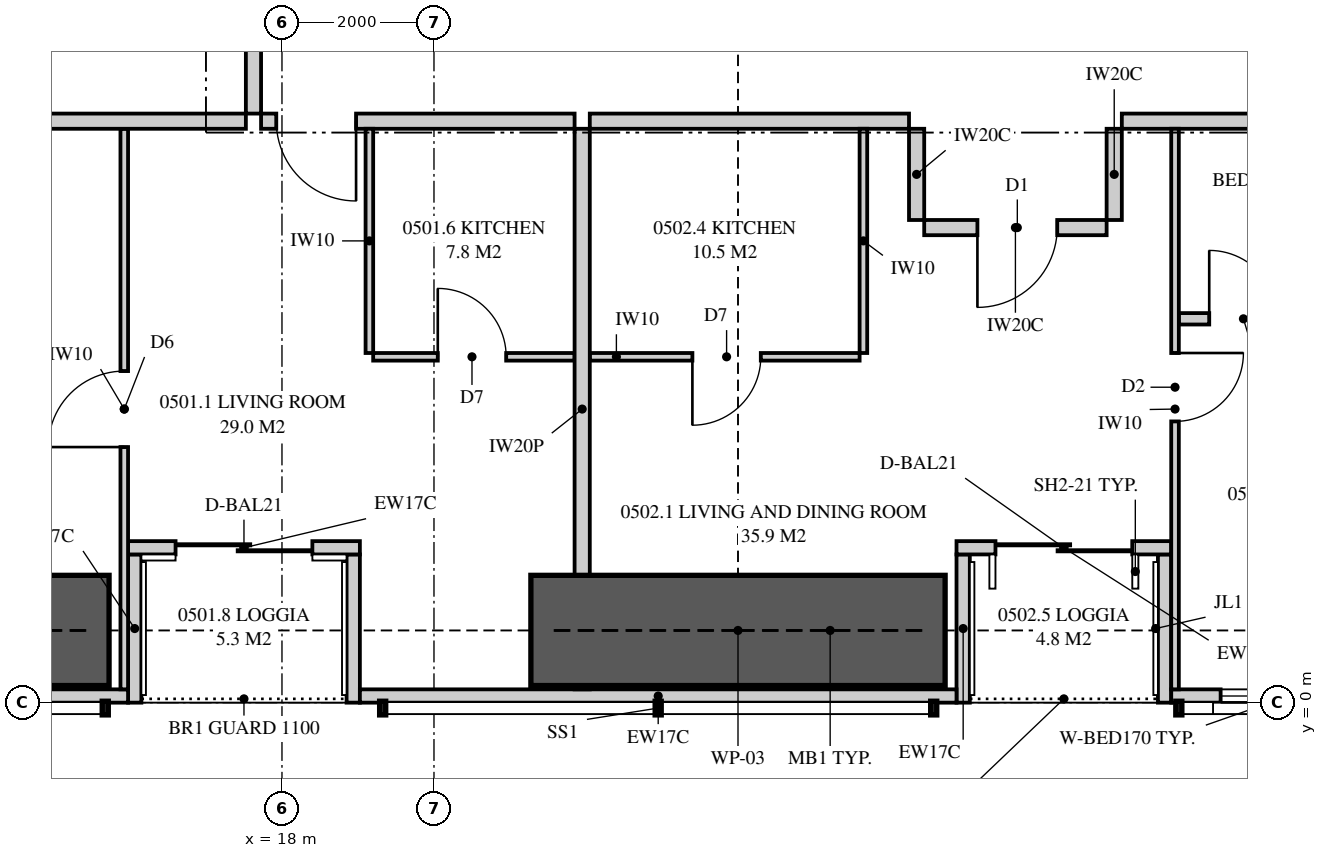
"""IFC4 building model, lengths in metres.
Left out: names, types, materials, properties, quantities, classifications, styles, units other than length and angle.
Written with IfcOpenShell. Run it as: python <this file> out.ifc"""

import sys

from ifc_helpers import new_model, si_unit, direction, frame, frame_2d, origin, place, context, subcontext, project, spatial, polyline, rectangle, outline, extrude, element, fill, save


model = new_model("IFC4")
c1 = context("Model", 3, precision=1e-05, world=origin(), true_north=direction((0.0, 1.0)))
c2 = subcontext(c1, "Body", "Model", "MODEL_VIEW")
j1 = project(units=[si_unit("LENGTHUNIT", "METRE"), si_unit("PLANEANGLEUNIT", "RADIAN")], contexts=[c1])
p1 = place(None, origin())
s1 = spatial("IfcSite", under=j1, at=p1, CompositionType="ELEMENT")
p2 = place(p1, origin())
s2 = spatial("IfcBuilding", under=s1, at=p2, CompositionType="ELEMENT")
p3 = place(p2, frame((0.0, 0.0, 24.35)))
s3 = spatial("IfcBuildingStorey", under=s2, at=p3, CompositionType="ELEMENT", Elevation=24.35)
p4 = place(p3, frame((5.051, 0.087, 0.0), z_axis=(0.0, 0.0, 1.0), x_axis=(1.0, 0.0, 0.0)))
e1 = element("IfcWall", 1, at=p4, inside=s3, PredefinedType="SOLIDWALL", context=c2, shape_type="SweptSolid", body=[
    extrude(outline(polyline([(0.0, 0.0), (10.924, 0.0), (10.924, 2.15), (7.949, 2.15), (7.949, 3.11), (7.793, 3.11), (7.793, 2.15), (7.745, 2.15), (7.745, 3.11), (0.0, 3.11), (0.0, 0.0)])), frame((0.0, 0.087, 0.0), z_axis=(0.0, -1.0, 0.0), x_axis=(1.0, 0.0, 0.0)), (0.0, 0.0, 1.0), 0.175),
])
p5 = place(p4, frame((2.199, 0.0, 0.4)))
e2 = element("IfcOpeningElement", 2, at=p5, cuts=e1, PredefinedType="OPENING", context=c2, shape_type="SweptSolid", body=[
    extrude(rectangle(XDim=1.8, YDim=1.7, at=frame_2d((0.9, 0.85))), frame((0.0, 0.097, 0.0), z_axis=(0.0, -1.0, 0.0), x_axis=(1.0, 0.0, 0.0)), (0.0, 0.0, 1.0), 0.195),
])
p6 = place(p3, frame((19.025, 0.087, 0.0), z_axis=(0.0, 0.0, 1.0), x_axis=(1.0, 0.0, 0.0)))
e3 = element("IfcWall", 3, at=p6, inside=s3, PredefinedType="SOLIDWALL", context=c2, shape_type="SweptSolid", body=[
    extrude(rectangle(XDim=7.85, YDim=0.175, at=frame_2d((3.925, 0.0))), origin(), (0.0, 0.0, 1.0), 2.15),
])
p7 = place(p3, frame((29.7, 0.087, 0.0), z_axis=(0.0, 0.0, 1.0), x_axis=(1.0, 0.0, 0.0)))
e4 = element("IfcWall", 4, at=p7, inside=s3, PredefinedType="SOLIDWALL", context=c2, shape_type="SweptSolid", body=[
    extrude(outline(polyline([(0.0, 0.0), (8.075, 0.0), (8.075, 3.11), (5.504, 3.11), (5.504, 2.15), (5.456, 2.15), (5.456, 3.11), (5.3, 3.11), (5.3, 2.15), (0.0, 2.15), (0.0, 0.0)])), frame((0.0, 0.087, 0.0), z_axis=(0.0, -1.0, 0.0), x_axis=(1.0, 0.0, 0.0)), (0.0, 0.0, 1.0), 0.175),
])
p8 = place(p7, frame((0.65, 0.0, 0.4)))
e5 = element("IfcOpeningElement", 5, at=p8, cuts=e4, PredefinedType="OPENING", context=c2, shape_type="SweptSolid", body=[
    extrude(rectangle(XDim=1.8, YDim=1.7, at=frame_2d((0.9, 0.85))), frame((0.0, 0.097, 0.0), z_axis=(0.0, -1.0, 0.0), x_axis=(1.0, 0.0, 0.0)), (0.0, 0.0, 1.0), 0.195),
])
p9 = place(p3, frame((15.975, 2.038, 0.0), z_axis=(0.0, 0.0, 1.0), x_axis=(1.0, 0.0, 0.0)))
e6 = element("IfcWall", 6, at=p9, inside=s3, PredefinedType="SOLIDWALL", context=c2, shape_type="SweptSolid", body=[
    extrude(rectangle(XDim=3.05, YDim=0.175, at=frame_2d((1.525, 0.0))), origin(), (0.0, 0.0, 1.0), 3.11),
])
p10 = place(p9, frame((0.625, 0.0, 0.0)))
e7 = element("IfcOpeningElement", 7, at=p10, cuts=e6, PredefinedType="OPENING", context=c2, shape_type="SweptSolid", body=[
    extrude(rectangle(XDim=1.8, YDim=2.1, at=frame_2d((0.9, 1.05))), frame((0.0, 0.097, 0.0), z_axis=(0.0, -1.0, 0.0), x_axis=(1.0, 0.0, 0.0)), (0.0, 0.0, 1.0), 0.195),
])
for number, where, z_axis, x_axis in (
    (8, (16.062, 0.0, 0.0), (0.0, 0.0, 1.0), (0.0, 1.0, 0.0)),
    (9, (18.938, 0.0, 0.0), (0.0, 0.0, 1.0), (0.0, 1.0, 0.0)),
):
    element("IfcWall", number, at=place(p3, frame(where, z_axis=z_axis, x_axis=x_axis)), inside=s3, PredefinedType="SOLIDWALL", context=c2, shape_type="SweptSolid", body=[
        extrude(outline(polyline([(0.0, 0.0), (1.95, 0.0), (1.95, 3.11), (1.75, 3.11), (1.75, 2.15), (0.15, 2.15), (0.15, 3.11), (0.0, 3.11), (0.0, 0.0)])), frame((0.0, 0.087, 0.0), z_axis=(0.0, -1.0, 0.0), x_axis=(1.0, 0.0, 0.0)), (0.0, 0.0, 1.0), 0.175),
    ])
p11 = place(p3, frame((26.875, 2.038, 0.0), z_axis=(0.0, 0.0, 1.0), x_axis=(1.0, 0.0, 0.0)))
e10 = element("IfcWall", 10, at=p11, inside=s3, PredefinedType="SOLIDWALL", context=c2, shape_type="SweptSolid", body=[
    extrude(rectangle(XDim=2.825, YDim=0.175, at=frame_2d((1.413, 0.0))), origin(), (0.0, 0.0, 1.0), 3.11),
])
p12 = place(p11, frame((0.512, 0.0, 0.0)))
e11 = element("IfcOpeningElement", 11, at=p12, cuts=e10, PredefinedType="OPENING", context=c2, shape_type="SweptSolid", body=[
    extrude(rectangle(XDim=1.8, YDim=2.1, at=frame_2d((0.9, 1.05))), frame((0.0, 0.097, 0.0), z_axis=(0.0, -1.0, 0.0), x_axis=(1.0, 0.0, 0.0)), (0.0, 0.0, 1.0), 0.195),
])
for number, where, z_axis, x_axis in (
    (12, (26.962, 0.0, 0.0), (0.0, 0.0, 1.0), (0.0, 1.0, 0.0)),
    (13, (29.613, 0.0, 0.0), (0.0, 0.0, 1.0), (0.0, 1.0, 0.0)),
):
    element("IfcWall", number, at=place(p3, frame(where, z_axis=z_axis, x_axis=x_axis)), inside=s3, PredefinedType="SOLIDWALL", context=c2, shape_type="SweptSolid", body=[
        extrude(outline(polyline([(0.0, 0.0), (1.95, 0.0), (1.95, 3.11), (1.75, 3.11), (1.75, 2.15), (0.15, 2.15), (0.15, 3.11), (0.0, 3.11), (0.0, 0.0)])), frame((0.0, 0.087, 0.0), z_axis=(0.0, -1.0, 0.0), x_axis=(1.0, 0.0, 0.0)), (0.0, 0.0, 1.0), 0.175),
    ])
p13 = place(p3, frame((21.95, 0.175, 0.0), z_axis=(0.0, 0.0, 1.0), x_axis=(0.0, 1.0, 0.0)))
e14 = element("IfcWall", 14, at=p13, inside=s3, PredefinedType="PARTITIONING", context=c2, shape_type="SweptSolid", body=[
    extrude(outline(polyline([(0.529, 2.15), (0.0, 2.15), (0.0, 0.0), (0.529, 0.0), (0.529, 0.09), (1.021, 0.09), (1.021, 0.0), (7.375, 0.0), (7.375, 3.11), (1.685, 3.11), (1.685, 2.15), (1.021, 2.15), (1.021, 2.06), (0.529, 2.06), (0.529, 2.15)])), frame((0.0, 0.1, 0.0), z_axis=(0.0, -1.0, 0.0), x_axis=(1.0, 0.0, 0.0)), (0.0, 0.0, 1.0), 0.2),
])
p14 = place(p3, frame((17.725, 7.65, 0.0), z_axis=(0.0, 0.0, 1.0), x_axis=(1.0, 0.0, 0.0)))
e15 = element("IfcWall", 15, at=p14, inside=s3, PredefinedType="PARTITIONING", context=c2, shape_type="SweptSolid", body=[
    extrude(rectangle(XDim=4.125, YDim=0.2, at=frame_2d((2.062, 0.0))), origin(), (0.0, 0.0, 1.0), 3.11),
])
p15 = place(p14, frame((0.2, 0.0, 0.0)))
e16 = element("IfcOpeningElement", 16, at=p15, cuts=e15, PredefinedType="OPENING", context=c2, shape_type="SweptSolid", body=[
    extrude(rectangle(XDim=1.05, YDim=2.2, at=frame_2d((0.525, 1.1))), frame((0.0, 0.11, 0.0), z_axis=(0.0, -1.0, 0.0), x_axis=(1.0, 0.0, 0.0)), (0.0, 0.0, 1.0), 0.22),
])
p16 = place(p3, frame((19.2, 4.55, 0.0), z_axis=(0.0, 0.0, 1.0), x_axis=(1.0, 0.0, 0.0)))
e17 = element("IfcWall", 17, at=p16, inside=s3, PredefinedType="PARTITIONING", context=c2, shape_type="SweptSolid", body=[
    extrude(rectangle(XDim=2.65, YDim=0.1, at=frame_2d((1.325, 0.0))), origin(), (0.0, 0.0, 1.0), 3.11),
])
p17 = place(p16, frame((0.85, 0.0, 0.0)))
e18 = element("IfcOpeningElement", 18, at=p17, cuts=e17, PredefinedType="OPENING", context=c2, shape_type="SweptSolid", body=[
    extrude(rectangle(XDim=0.9, YDim=2.1, at=frame_2d((0.45, 1.05))), frame((0.0, 0.06, 0.0), z_axis=(0.0, -1.0, 0.0), x_axis=(1.0, 0.0, 0.0)), (0.0, 0.0, 1.0), 0.12),
])
p18 = place(p3, frame((19.15, 4.6, 0.0), z_axis=(0.0, 0.0, 1.0), x_axis=(0.0, 1.0, 0.0)))
e19 = element("IfcWall", 19, at=p18, inside=s3, PredefinedType="PARTITIONING", context=c2, shape_type="SweptSolid", body=[
    extrude(rectangle(XDim=2.95, YDim=0.1, at=frame_2d((1.475, 0.0))), origin(), (0.0, 0.0, 1.0), 3.11),
])
p19 = place(p3, frame((15.925, 0.175, 0.0), z_axis=(0.0, 0.0, 1.0), x_axis=(0.0, 1.0, 0.0)))
e20 = element("IfcWall", 20, at=p19, inside=s3, PredefinedType="PARTITIONING", context=c2, shape_type="SweptSolid", body=[
    extrude(outline(polyline([(0.0, 0.0), (7.375, 0.0), (7.375, 3.11), (1.635, 3.11), (1.635, 2.15), (0.0, 2.15), (0.0, 3.11), (0.0, 0.0)])), frame((0.0, 0.05, 0.0), z_axis=(0.0, -1.0, 0.0), x_axis=(1.0, 0.0, 0.0)), (0.0, 0.0, 1.0), 0.1),
])
p20 = place(p19, frame((3.188, 0.0, 0.0)))
e21 = element("IfcOpeningElement", 21, at=p20, cuts=e20, PredefinedType="OPENING", context=c2, shape_type="SweptSolid", body=[
    extrude(rectangle(XDim=1.0, YDim=2.1, at=frame_2d((0.5, 1.05))), frame((0.0, 0.06, 0.0), z_axis=(0.0, -1.0, 0.0), x_axis=(1.0, 0.0, 0.0)), (0.0, 0.0, 1.0), 0.12),
])
p21 = place(p3, frame((22.05, 7.65, 0.0), z_axis=(0.0, 0.0, 1.0), x_axis=(1.0, 0.0, 0.0)))
e22 = element("IfcWall", 22, at=p21, inside=s3, PredefinedType="PARTITIONING", context=c2, shape_type="SweptSolid", body=[
    extrude(outline(polyline([(0.0, 0.0), (4.2, 0.0), (4.2, 3.11), (2.287, 3.11), (2.287, 2.541), (1.613, 2.541), (1.613, 3.11), (0.0, 3.11), (0.0, 0.0)])), frame((0.0, 0.1, 0.0), z_axis=(0.0, -1.0, 0.0), x_axis=(1.0, 0.0, 0.0)), (0.0, 0.0, 1.0), 0.2),
])
p22 = place(p3, frame((29.75, 0.175, 0.0), z_axis=(0.0, 0.0, 1.0), x_axis=(0.0, 1.0, 0.0)))
e23 = element("IfcWall", 23, at=p22, inside=s3, PredefinedType="PARTITIONING", context=c2, shape_type="SweptSolid", body=[
    extrude(outline(polyline([(0.0, 0.0), (7.375, 0.0), (7.375, 3.11), (1.635, 3.11), (1.635, 2.15), (0.0, 2.15), (0.0, 3.11), (0.0, 0.0)])), frame((0.0, 0.05, 0.0), z_axis=(0.0, -1.0, 0.0), x_axis=(1.0, 0.0, 0.0)), (0.0, 0.0, 1.0), 0.1),
])
p23 = place(p22, frame((3.525, 0.0, 0.0)))
e24 = element("IfcOpeningElement", 24, at=p23, cuts=e23, PredefinedType="OPENING", context=c2, shape_type="SweptSolid", body=[
    extrude(rectangle(XDim=0.9, YDim=2.1, at=frame_2d((0.45, 1.05))), frame((0.0, 0.06, 0.0), z_axis=(0.0, -1.0, 0.0), x_axis=(1.0, 0.0, 0.0)), (0.0, 0.0, 1.0), 0.12),
])
p24 = place(p3, frame((29.8, 5.05, 0.0), z_axis=(0.0, 0.0, 1.0), x_axis=(1.0, 0.0, 0.0)))
e25 = element("IfcWall", 25, at=p24, inside=s3, PredefinedType="PLUMBINGWALL", context=c2, shape_type="SweptSolid", body=[
    extrude(rectangle(XDim=3.45, YDim=0.15, at=frame_2d((1.725, 0.0))), origin(), (0.0, 0.0, 1.0), 3.11),
])
p25 = place(p24, frame((0.4, 0.0, 0.0)))
e26 = element("IfcOpeningElement", 26, at=p25, cuts=e25, PredefinedType="OPENING", context=c2, shape_type="SweptSolid", body=[
    extrude(rectangle(XDim=0.9, YDim=2.1, at=frame_2d((0.45, 1.05))), frame((0.0, 0.085, 0.0), z_axis=(0.0, -1.0, 0.0), x_axis=(1.0, 0.0, 0.0)), (0.0, 0.0, 1.0), 0.17),
])
p26 = place(p3, frame((22.05, 4.55, 0.0), z_axis=(0.0, 0.0, 1.0), x_axis=(1.0, 0.0, 0.0)))
e27 = element("IfcWall", 27, at=p26, inside=s3, PredefinedType="PARTITIONING", context=c2, shape_type="SweptSolid", body=[
    extrude(outline(polyline([(0.0, 0.0), (3.55, 0.0), (3.55, 3.11), (2.237, 3.11), (2.237, 2.541), (1.663, 2.541), (1.663, 3.11), (0.0, 3.11), (0.0, 0.0)])), frame((0.0, 0.05, 0.0), z_axis=(0.0, -1.0, 0.0), x_axis=(1.0, 0.0, 0.0)), (0.0, 0.0, 1.0), 0.1),
])
p27 = place(p26, frame((1.35, 0.0, 0.0)))
e28 = element("IfcOpeningElement", 28, at=p27, cuts=e27, PredefinedType="OPENING", context=c2, shape_type="SweptSolid", body=[
    extrude(rectangle(XDim=0.9, YDim=2.1, at=frame_2d((0.45, 1.05))), frame((0.0, 0.06, 0.0), z_axis=(0.0, -1.0, 0.0), x_axis=(1.0, 0.0, 0.0)), (0.0, 0.0, 1.0), 0.12),
])
p28 = place(p3, frame((25.65, 4.6, 0.0), z_axis=(0.0, 0.0, 1.0), x_axis=(0.0, 1.0, 0.0)))
e29 = element("IfcWall", 29, at=p28, inside=s3, PredefinedType="PARTITIONING", context=c2, shape_type="SweptSolid", body=[
    extrude(rectangle(XDim=2.95, YDim=0.1, at=frame_2d((1.475, 0.0))), origin(), (0.0, 0.0, 1.0), 3.11),
])
p29 = place(p3, frame((2.0, 7.65, 0.0), z_axis=(0.0, 0.0, 1.0), x_axis=(1.0, 0.0, 0.0)))
e30 = element("IfcWall", 30, at=p29, inside=s3, PredefinedType="PARTITIONING", context=c2, shape_type="SweptSolid", body=[
    extrude(outline(polyline([(0.0, 0.0), (15.525, 0.0), (15.525, 3.11), (11.337, 3.11), (11.337, 2.541), (10.663, 2.541), (10.663, 3.11), (9.51, 3.11), (9.51, 2.51), (6.89, 2.51), (6.89, 3.11), (2.969, 3.11), (2.969, 2.541), (2.74, 2.541), (2.74, 2.15), (0.896, 2.15), (0.896, 3.11), (0.0, 3.11), (0.0, 0.0)])), frame((0.0, 0.1, 0.0), z_axis=(0.0, -1.0, 0.0), x_axis=(1.0, 0.0, 0.0)), (0.0, 0.0, 1.0), 0.2),
])
p30 = place(p3, frame((17.625, 7.75, 0.0), z_axis=(0.0, 0.0, 1.0), x_axis=(0.0, 1.0, 0.0)))
e31 = element("IfcWall", 31, at=p30, inside=s3, PredefinedType="PARTITIONING", context=c2, shape_type="SweptSolid", body=[
    extrude(outline(polyline([(0.0, 0.0), (9.35, 0.0), (9.35, 3.11), (5.587, 3.11), (5.587, 2.541), (4.913, 2.541), (4.913, 3.11), (0.0, 3.11), (0.0, 0.0)])), frame((0.0, 0.1, 0.0), z_axis=(0.0, -1.0, 0.0), x_axis=(1.0, 0.0, 0.0)), (0.0, 0.0, 1.0), 0.2),
])
p31 = place(p3, frame((29.05, 7.65, 0.0), z_axis=(0.0, 0.0, 1.0), x_axis=(1.0, 0.0, 0.0)))
e32 = element("IfcWall", 32, at=p31, inside=s3, PredefinedType="PARTITIONING", context=c2, shape_type="SweptSolid", body=[
    extrude(rectangle(XDim=4.2, YDim=0.2, at=frame_2d((2.1, 0.0))), origin(), (0.0, 0.0, 1.0), 3.11),
])
p32 = place(p3, frame((26.45, 6.25, 0.0), z_axis=(0.0, 0.0, 1.0), x_axis=(1.0, 0.0, 0.0)))
e33 = element("IfcWall", 33, at=p32, inside=s3, PredefinedType="PARTITIONING", context=c2, shape_type="SweptSolid", body=[
    extrude(rectangle(XDim=2.4, YDim=0.2, at=frame_2d((1.2, 0.0))), origin(), (0.0, 0.0, 1.0), 3.11),
])
p33 = place(p32, frame((0.7, 0.0, 0.0)))
e34 = element("IfcOpeningElement", 34, at=p33, cuts=e33, PredefinedType="OPENING", context=c2, shape_type="SweptSolid", body=[
    extrude(rectangle(XDim=1.05, YDim=2.2, at=frame_2d((0.525, 1.1))), frame((0.0, 0.11, 0.0), z_axis=(0.0, -1.0, 0.0), x_axis=(1.0, 0.0, 0.0)), (0.0, 0.0, 1.0), 0.22),
])
for number, where, z_axis, x_axis in (
    (35, (26.35, 7.55, 0.0), (0.0, 0.0, 1.0), (0.0, -1.0, 0.0)),
    (36, (28.95, 7.55, 0.0), (0.0, 0.0, 1.0), (0.0, -1.0, 0.0)),
):
    element("IfcWall", number, at=place(p3, frame(where, z_axis=z_axis, x_axis=x_axis)), inside=s3, PredefinedType="PARTITIONING", context=c2, shape_type="SweptSolid", body=[
        extrude(rectangle(XDim=1.2, YDim=0.2, at=frame_2d((0.6, 0.0))), origin(), (0.0, 0.0, 1.0), 3.11),
    ])
for number, where, z_axis, x_axis in (
    (37, (10.275, 0.95, 0.0), (0.0, 0.0, 1.0), (1.0, 0.0, 0.0)),
    (38, (21.275, 0.95, 0.0), (0.0, 0.0, 1.0), (1.0, 0.0, 0.0)),
):
    element("IfcWall", number, at=place(p3, frame(where, z_axis=z_axis, x_axis=x_axis)), inside=s3, PredefinedType="SHEAR", context=c2, shape_type="SweptSolid", body=[
        extrude(rectangle(XDim=5.45, YDim=1.45, at=frame_2d((2.725, 0.0))), origin(), (0.0, 0.0, 1.0), 3.35),
    ])
p34 = place(p10, origin())
e39 = element("IfcDoor", 39, at=p34, inside=s3, OperationType="SLIDING_TO_LEFT", PredefinedType="DOOR", context=c2, shape_type="SweptSolid", body=[
    extrude(rectangle(XDim=1.8, YDim=2.1, at=frame_2d((0.9, 1.05))), frame((0.0, 0.025, 0.0), z_axis=(0.0, -1.0, 0.0), x_axis=(1.0, 0.0, 0.0)), (0.0, 0.0, 1.0), 0.05),
])
fill(e7, e39)
p35 = place(p12, origin())
e40 = element("IfcDoor", 40, at=p35, inside=s3, OperationType="SLIDING_TO_LEFT", PredefinedType="DOOR", context=c2, shape_type="SweptSolid", body=[
    extrude(rectangle(XDim=1.8, YDim=2.1, at=frame_2d((0.9, 1.05))), frame((0.0, 0.025, 0.0), z_axis=(0.0, -1.0, 0.0), x_axis=(1.0, 0.0, 0.0)), (0.0, 0.0, 1.0), 0.05),
])
fill(e11, e40)
p36 = place(p8, origin())
e41 = element("IfcWindow", 41, at=p36, inside=s3, PartitioningType="SINGLE_PANEL", PredefinedType="WINDOW", context=c2, shape_type="SweptSolid", body=[
    extrude(rectangle(XDim=1.8, YDim=1.7, at=frame_2d((0.9, 0.85))), frame((0.0, 0.03, 0.0), z_axis=(0.0, -1.0, 0.0), x_axis=(1.0, 0.0, 0.0)), (0.0, 0.0, 1.0), 0.06),
])
fill(e5, e41)
p37 = place(p15, frame((1.05, 0.0, 0.0), z_axis=(0.0, 0.0, 1.0), x_axis=(-1.0, 0.0, 0.0)))
e42 = element("IfcDoor", 42, at=p37, inside=s3, OperationType="SINGLE_SWING_LEFT", PredefinedType="DOOR", context=c2, shape_type="SweptSolid", body=[
    extrude(rectangle(XDim=1.05, YDim=2.2, at=frame_2d((0.525, 1.1))), frame((0.0, 0.025, 0.0), z_axis=(0.0, -1.0, 0.0), x_axis=(1.0, 0.0, 0.0)), (0.0, 0.0, 1.0), 0.05),
])
fill(e16, e42)
p38 = place(p17, origin())
e43 = element("IfcDoor", 43, at=p38, inside=s3, OperationType="SINGLE_SWING_LEFT", PredefinedType="DOOR", context=c2, shape_type="SweptSolid", body=[
    extrude(rectangle(XDim=0.9, YDim=2.1, at=frame_2d((0.45, 1.05))), frame((0.0, 0.025, 0.0), z_axis=(0.0, -1.0, 0.0), x_axis=(1.0, 0.0, 0.0)), (0.0, 0.0, 1.0), 0.05),
])
fill(e18, e43)
p39 = place(p20, origin())
e44 = element("IfcDoor", 44, at=p39, inside=s3, OperationType="SINGLE_SWING_LEFT", PredefinedType="DOOR", context=c2, shape_type="SweptSolid", body=[
    extrude(rectangle(XDim=1.0, YDim=2.1, at=frame_2d((0.5, 1.05))), frame((0.0, 0.025, 0.0), z_axis=(0.0, -1.0, 0.0), x_axis=(1.0, 0.0, 0.0)), (0.0, 0.0, 1.0), 0.05),
])
fill(e21, e44)
p40 = place(p33, frame((1.05, 0.0, 0.0), z_axis=(0.0, 0.0, 1.0), x_axis=(-1.0, 0.0, 0.0)))
e45 = element("IfcDoor", 45, at=p40, inside=s3, OperationType="SINGLE_SWING_RIGHT", PredefinedType="DOOR", context=c2, shape_type="SweptSolid", body=[
    extrude(rectangle(XDim=1.05, YDim=2.2, at=frame_2d((0.525, 1.1))), frame((0.0, 0.025, 0.0), z_axis=(0.0, -1.0, 0.0), x_axis=(1.0, 0.0, 0.0)), (0.0, 0.0, 1.0), 0.05),
])
fill(e34, e45)
p41 = place(p23, frame((0.9, 0.0, 0.0), z_axis=(0.0, 0.0, 1.0), x_axis=(-1.0, 0.0, 0.0)))
e46 = element("IfcDoor", 46, at=p41, inside=s3, OperationType="SINGLE_SWING_LEFT", PredefinedType="DOOR", context=c2, shape_type="SweptSolid", body=[
    extrude(rectangle(XDim=0.9, YDim=2.1, at=frame_2d((0.45, 1.05))), frame((0.0, 0.025, 0.0), z_axis=(0.0, -1.0, 0.0), x_axis=(1.0, 0.0, 0.0)), (0.0, 0.0, 1.0), 0.05),
])
fill(e24, e46)
p42 = place(p25, origin())
e47 = element("IfcDoor", 47, at=p42, inside=s3, OperationType="SINGLE_SWING_LEFT", PredefinedType="DOOR", context=c2, shape_type="SweptSolid", body=[
    extrude(rectangle(XDim=0.9, YDim=2.1, at=frame_2d((0.45, 1.05))), frame((0.0, 0.025, 0.0), z_axis=(0.0, -1.0, 0.0), x_axis=(1.0, 0.0, 0.0)), (0.0, 0.0, 1.0), 0.05),
])
fill(e26, e47)
p43 = place(p27, frame((0.9, 0.0, 0.0), z_axis=(0.0, 0.0, 1.0), x_axis=(-1.0, 0.0, 0.0)))
e48 = element("IfcDoor", 48, at=p43, inside=s3, OperationType="SINGLE_SWING_RIGHT", PredefinedType="DOOR", context=c2, shape_type="SweptSolid", body=[
    extrude(rectangle(XDim=0.9, YDim=2.1, at=frame_2d((0.45, 1.05))), frame((0.0, 0.025, 0.0), z_axis=(0.0, -1.0, 0.0), x_axis=(1.0, 0.0, 0.0)), (0.0, 0.0, 1.0), 0.05),
])
fill(e28, e48)
save(model, sys.argv[1])
